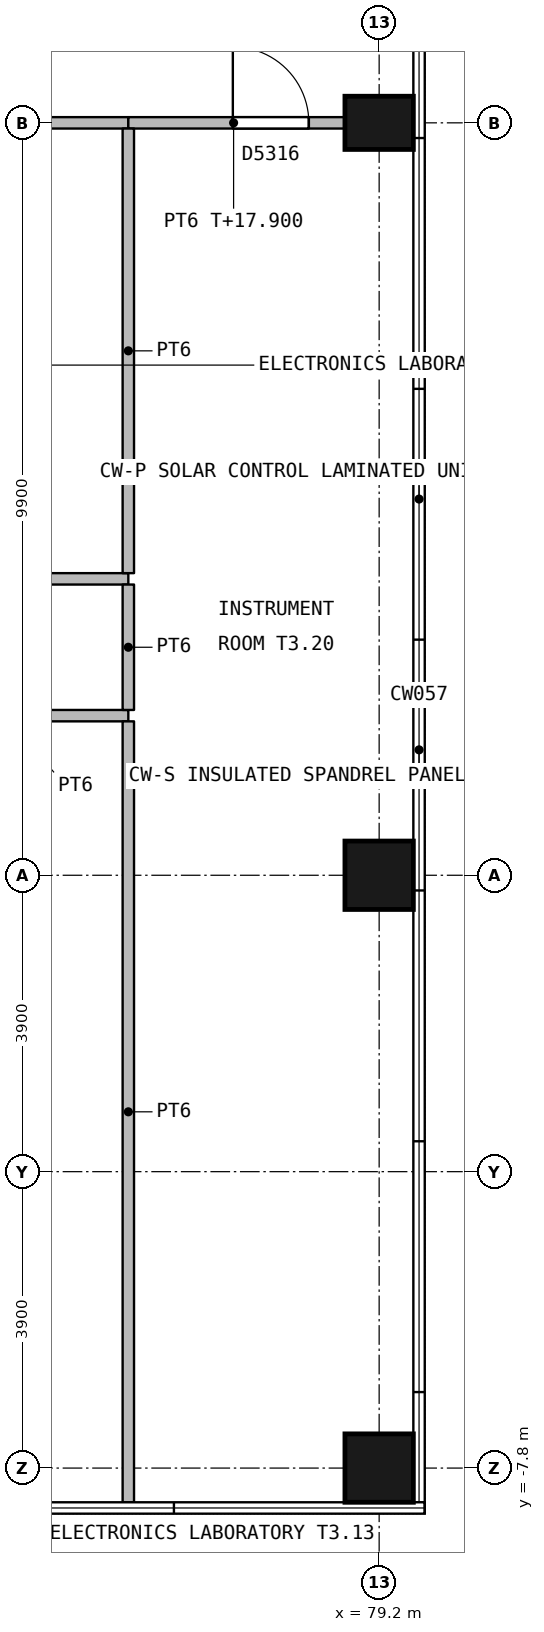
"""IFC4 building model, lengths in metres.
Left out: names, types, materials, properties, quantities, classifications, styles, units other than length and angle.
Written with IfcOpenShell. Run it as: python <this file> out.ifc"""

import sys

from ifc_helpers import new_model, si_unit, direction, frame, frame_2d, origin, origin_2d, place, context, subcontext, project, spatial, rectangle, extrude, element, fill, save


model = new_model("IFC4")
c1 = context("Model", 3, precision=1e-05, world=origin(), true_north=direction((0.0, 1.0)))
c2 = subcontext(c1, "Body", "Model", "MODEL_VIEW")
j1 = project(units=[si_unit("LENGTHUNIT", "METRE"), si_unit("PLANEANGLEUNIT", "RADIAN")], contexts=[c1])
p1 = place(None, origin())
s1 = spatial("IfcSite", under=j1, at=p1, CompositionType="ELEMENT")
p2 = place(p1, origin())
s2 = spatial("IfcBuilding", under=s1, at=p2, CompositionType="ELEMENT")
p3 = place(p2, frame((0.0, 0.0, 14.4)))
s3 = spatial("IfcBuildingStorey", under=s2, at=p3, CompositionType="ELEMENT", Elevation=14.4)
for number, where, z_axis, x_axis in (
    (1, (79.2, -7.8, 0.0), (0.0, 0.0, 1.0), (1.0, 0.0, 0.0)),
    (2, (79.2, 0.0, 0.0), (0.0, 0.0, 1.0), (1.0, 0.0, 0.0)),
):
    element("IfcColumn", number, at=place(p3, frame(where, z_axis=z_axis, x_axis=x_axis)), inside=s3, PredefinedType="COLUMN", context=c2, shape_type="SweptSolid", body=[
        extrude(rectangle(XDim=0.9, YDim=0.9, at=origin_2d()), origin(), (0.0, 0.0, 1.0), 4.5),
    ])
p4 = place(p3, frame((79.2, 9.9, 0.0), z_axis=(0.0, 0.0, 1.0), x_axis=(1.0, 0.0, 0.0)))
e3 = element("IfcColumn", 3, at=p4, inside=s3, PredefinedType="COLUMN", context=c2, shape_type="SweptSolid", body=[
    extrude(rectangle(XDim=0.9, YDim=0.7, at=origin_2d()), origin(), (0.0, 0.0, 1.0), 4.5),
])
p5 = place(p3, frame((73.05, 9.9, 0.0), z_axis=(0.0, 0.0, 1.0), x_axis=(1.0, 0.0, 0.0)))
e4 = element("IfcWall", 4, at=p5, inside=s3, PredefinedType="PARTITIONING", context=c2, shape_type="SweptSolid", body=[
    extrude(rectangle(XDim=2.85, YDim=0.15, at=frame_2d((1.425, 0.0))), origin(), (0.0, 0.0, 1.0), 3.5),
])
p6 = place(p5, frame((0.7, 0.0, 0.0)))
e5 = element("IfcOpeningElement", 5, at=p6, cuts=e4, PredefinedType="OPENING", context=c2, shape_type="SweptSolid", body=[
    extrude(rectangle(XDim=1.0, YDim=2.1, at=frame_2d((0.5, 1.05))), frame((0.0, 0.085, 0.0), z_axis=(0.0, -1.0, 0.0), x_axis=(1.0, 0.0, 0.0)), (0.0, 0.0, 1.0), 0.17),
])
p7 = place(p3, frame((75.9, 9.9, 0.0), z_axis=(0.0, 0.0, 1.0), x_axis=(1.0, 0.0, 0.0)))
e6 = element("IfcWall", 6, at=p7, inside=s3, PredefinedType="PARTITIONING", context=c2, shape_type="SweptSolid", body=[
    extrude(rectangle(XDim=2.85, YDim=0.15, at=frame_2d((1.425, 0.0))), origin(), (0.0, 0.0, 1.0), 3.5),
])
p8 = place(p7, frame((1.375, 0.0, 0.0)))
e7 = element("IfcOpeningElement", 7, at=p8, cuts=e6, PredefinedType="OPENING", context=c2, shape_type="SweptSolid", body=[
    extrude(rectangle(XDim=1.0, YDim=2.1, at=frame_2d((0.5, 1.05))), frame((0.0, 0.085, 0.0), z_axis=(0.0, -1.0, 0.0), x_axis=(1.0, 0.0, 0.0)), (0.0, 0.0, 1.0), 0.17),
])
p9 = place(p3, frame((75.9, 2.1, 0.0), z_axis=(0.0, 0.0, 1.0), x_axis=(-1.0, 0.0, 0.0)))
e8 = element("IfcWall", 8, at=p9, inside=s3, PredefinedType="PARTITIONING", context=c2, shape_type="SweptSolid", body=[
    extrude(rectangle(XDim=3.225, YDim=0.15, at=frame_2d((1.612, 0.0))), origin(), (0.0, 0.0, 1.0), 4.2),
])
p10 = place(p9, frame((1.15, 0.0, 0.0)))
e9 = element("IfcOpeningElement", 9, at=p10, cuts=e8, PredefinedType="OPENING", context=c2, shape_type="SweptSolid", body=[
    extrude(rectangle(XDim=1.0, YDim=2.1, at=frame_2d((0.5, 1.05))), frame((0.0, 0.085, 0.0), z_axis=(0.0, -1.0, 0.0), x_axis=(1.0, 0.0, 0.0)), (0.0, 0.0, 1.0), 0.17),
])
p11 = place(p3, frame((75.9, -8.25, 0.0), z_axis=(0.0, 0.0, 1.0), x_axis=(0.0, 1.0, 0.0)))
e10 = element("IfcWall", 10, at=p11, inside=s3, PredefinedType="PARTITIONING", context=c2, shape_type="SweptSolid", body=[
    extrude(rectangle(XDim=10.275, YDim=0.15, at=frame_2d((5.137, 0.0))), origin(), (0.0, 0.0, 1.0), 4.2),
])
p12 = place(p3, frame((75.9, 3.9, 0.0), z_axis=(0.0, 0.0, 1.0), x_axis=(-1.0, 0.0, 0.0)))
e11 = element("IfcWall", 11, at=p12, inside=s3, PredefinedType="PARTITIONING", context=c2, shape_type="SweptSolid", body=[
    extrude(rectangle(XDim=3.3, YDim=0.15, at=frame_2d((1.65, 0.0))), origin(), (0.0, 0.0, 1.0), 4.2),
])
p13 = place(p3, frame((75.9, 2.175, 0.0), z_axis=(0.0, 0.0, 1.0), x_axis=(0.0, 1.0, 0.0)))
e12 = element("IfcWall", 12, at=p13, inside=s3, PredefinedType="PARTITIONING", context=c2, shape_type="SweptSolid", body=[
    extrude(rectangle(XDim=1.65, YDim=0.15, at=frame_2d((0.825, 0.0))), origin(), (0.0, 0.0, 1.0), 4.2),
])
p14 = place(p3, frame((75.9, 3.975, 0.0), z_axis=(0.0, 0.0, 1.0), x_axis=(0.0, 1.0, 0.0)))
e13 = element("IfcWall", 13, at=p14, inside=s3, PredefinedType="PARTITIONING", context=c2, shape_type="SweptSolid", body=[
    extrude(rectangle(XDim=5.85, YDim=0.15, at=frame_2d((2.925, 0.0))), origin(), (0.0, 0.0, 1.0), 4.2),
])
p15 = place(p8, origin())
e14 = element("IfcDoor", 14, at=p15, inside=s3, OperationType="SINGLE_SWING_LEFT", PredefinedType="DOOR", context=c2, shape_type="SweptSolid", body=[
    extrude(rectangle(XDim=1.0, YDim=2.1, at=frame_2d((0.5, 1.05))), frame((0.0, 0.027, 0.0), z_axis=(0.0, -1.0, 0.0), x_axis=(1.0, 0.0, 0.0)), (0.0, 0.0, 1.0), 0.054),
])
fill(e7, e14)
save(model, sys.argv[1])
